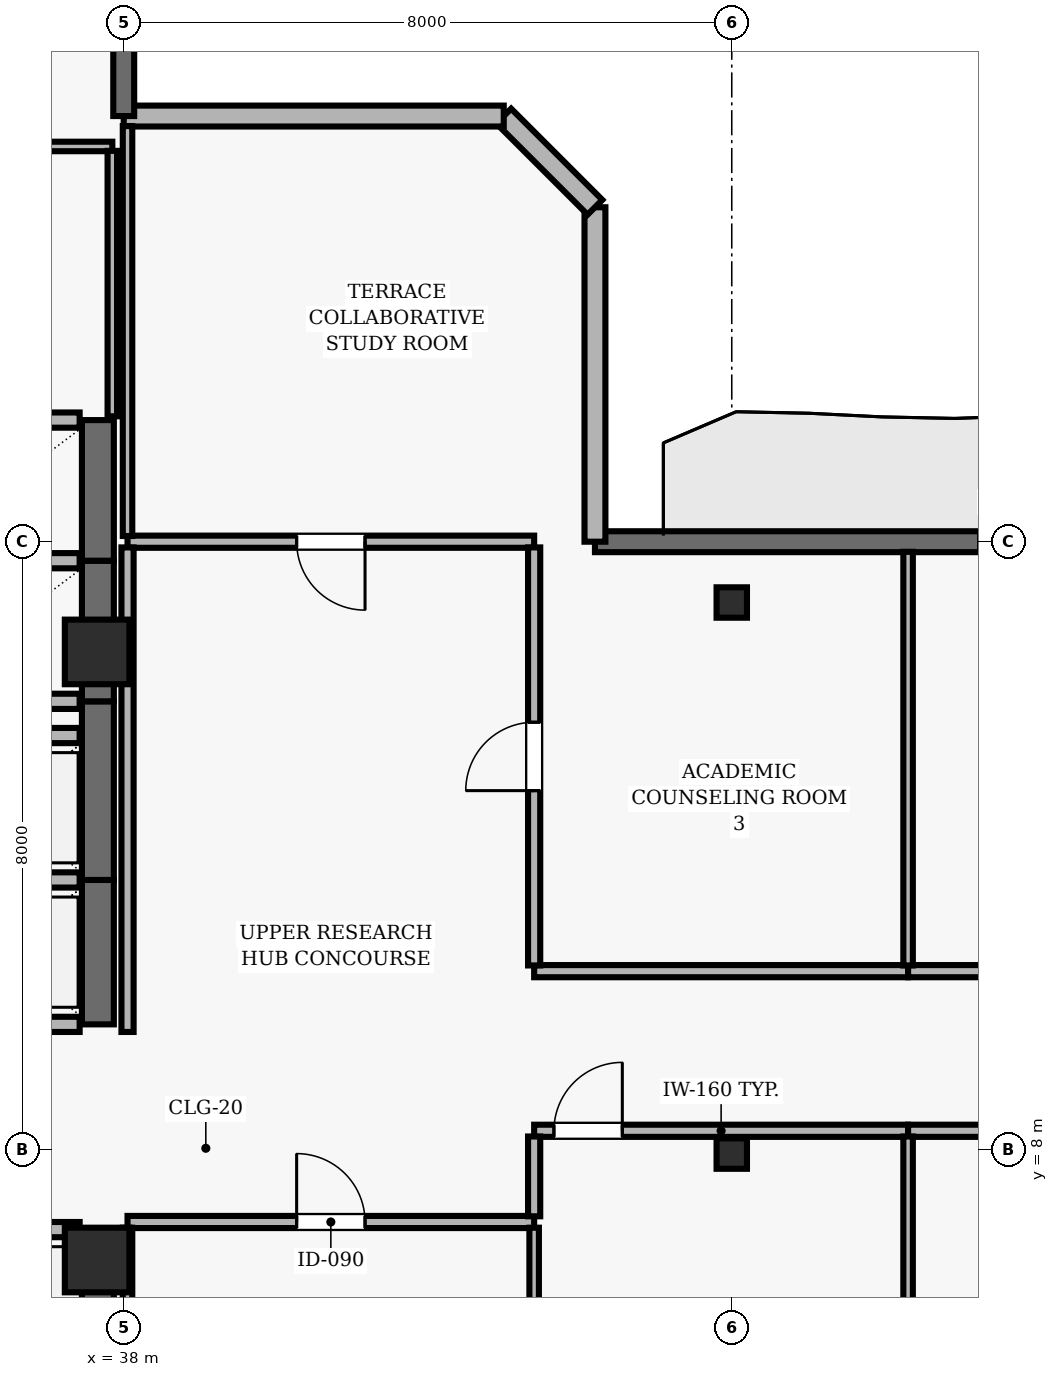
"""IFC4 building model, lengths in metres.
Left out: names, types, materials, properties, quantities, classifications, styles, units other than length and angle.
Written with IfcOpenShell. Run it as: python <this file> out.ifc"""

import sys

from ifc_helpers import new_model, si_unit, direction, frame, frame_2d, origin, origin_2d, place, context, subcontext, project, spatial, rectangle, hollow_rectangle, extrude, element, fill, save


model = new_model("IFC4")
c1 = context("Model", 3, precision=1e-05, world=origin(), true_north=direction((0.0, 1.0)))
c2 = subcontext(c1, "Body", "Model", "MODEL_VIEW")
j1 = project(units=[si_unit("LENGTHUNIT", "METRE"), si_unit("PLANEANGLEUNIT", "RADIAN")], contexts=[c1])
p1 = place(None, origin())
s1 = spatial("IfcSite", under=j1, at=p1, CompositionType="ELEMENT")
p2 = place(p1, origin())
s2 = spatial("IfcBuilding", under=s1, at=p2, CompositionType="ELEMENT")
p3 = place(p2, frame((0.0, 0.0, 295.0)))
s3 = spatial("IfcBuildingStorey", under=s2, at=p3, CompositionType="ELEMENT", Elevation=295.0)
for number, where, z_axis, x_axis in (
    (1, (37.65, 6.55, 0.0), (0.0, 0.0, 1.0), (1.0, 0.0, 0.0)),
    (2, (37.65, 14.55, 0.0), (0.0, 0.0, 1.0), (1.0, 0.0, 0.0)),
):
    element("IfcColumn", number, at=place(p3, frame(where, z_axis=z_axis, x_axis=x_axis)), inside=s3, PredefinedType="COLUMN", context=c2, shape_type="SweptSolid", body=[
        extrude(rectangle(XDim=0.85, YDim=0.85, at=origin_2d()), origin(), (0.0, 0.0, 1.0), 3.9),
    ])
for number, where, z_axis, x_axis in (
    (3, (46.0, 7.95, 0.0), (0.0, 0.0, 1.0), (1.0, 0.0, 0.0)),
    (4, (46.0, 15.2, 0.0), (0.0, 0.0, 1.0), (1.0, 0.0, 0.0)),
):
    element("IfcColumn", number, at=place(p3, frame(where, z_axis=z_axis, x_axis=x_axis)), inside=s3, PredefinedType="COLUMN", context=c2, shape_type="SweptSolid", body=[
        extrude(hollow_rectangle(XDim=0.4, YDim=0.4, WallThickness=0.02, at=origin_2d()), origin(), (0.0, 0.0, 1.0), 3.9),
    ])
p4 = place(p3, frame((57.3, 16.0, 0.0), z_axis=(0.0, 0.0, 1.0), x_axis=(-1.0, 0.0, 0.0)))
e5 = element("IfcWall", 5, at=p4, inside=s3, PredefinedType="SOLIDWALL", context=c2, shape_type="SweptSolid", body=[
    extrude(rectangle(XDim=13.1, YDim=0.275, at=frame_2d((6.55, 0.0))), origin(), (0.0, 0.0, 1.0), 3.69),
])
p5 = place(p4, frame((7.05, 0.0, 0.0)))
e6 = element("IfcOpeningElement", 6, at=p5, cuts=e5, PredefinedType="OPENING", context=c2, shape_type="SweptSolid", body=[
    extrude(rectangle(XDim=1.0, YDim=2.2, at=frame_2d((0.5, 1.1))), frame((0.0, 0.147, 0.0), z_axis=(0.0, -1.0, 0.0), x_axis=(1.0, 0.0, 0.0)), (0.0, 0.0, 1.0), 0.295),
])
p6 = place(p3, frame((44.2, 16.0, 0.0), z_axis=(0.0, 0.0, 1.0), x_axis=(0.0, 1.0, 0.0)))
e7 = element("IfcWall", 7, at=p6, inside=s3, PredefinedType="SOLIDWALL", context=c2, shape_type="SweptSolid", body=[
    extrude(rectangle(XDim=4.4, YDim=0.275, at=frame_2d((2.2, 0.0))), origin(), (0.0, 0.0, 1.0), 3.69),
])
p7 = place(p3, frame((44.2, 20.4, 0.0), z_axis=(0.0, 0.0, 1.0), x_axis=(-0.707034851297, 0.707178703759, 0.0)))
e8 = element("IfcWall", 8, at=p7, inside=s3, PredefinedType="SOLIDWALL", context=c2, shape_type="SweptSolid", body=[
    extrude(rectangle(XDim=1.697, YDim=0.275, at=frame_2d((0.849, 0.0))), origin(), (0.0, 0.0, 1.0), 3.69),
])
p8 = place(p3, frame((43.0, 21.6, 0.0), z_axis=(0.0, 0.0, 1.0), x_axis=(-1.0, 0.0, 0.0)))
e9 = element("IfcWall", 9, at=p8, inside=s3, PredefinedType="SOLIDWALL", context=c2, shape_type="SweptSolid", body=[
    extrude(rectangle(XDim=5.0, YDim=0.275, at=frame_2d((2.5, 0.0))), origin(), (0.0, 0.0, 1.0), 3.69),
])
p9 = place(p3, frame((38.0, 21.6, 0.0), z_axis=(0.0, 0.0, 1.0), x_axis=(0.0, 1.0, 0.0)))
e10 = element("IfcWall", 10, at=p9, inside=s3, PredefinedType="SOLIDWALL", context=c2, shape_type="SweptSolid", body=[
    extrude(rectangle(XDim=13.7, YDim=0.275, at=frame_2d((6.85, 0.0))), origin(), (0.0, 0.0, 1.0), 3.69),
])
p10 = place(p9, frame((5.35, 0.0, 0.0)))
e11 = element("IfcOpeningElement", 11, at=p10, cuts=e10, PredefinedType="OPENING", context=c2, shape_type="SweptSolid", body=[
    extrude(rectangle(XDim=1.0, YDim=2.2, at=frame_2d((0.5, 1.1))), frame((0.0, 0.147, 0.0), z_axis=(0.0, -1.0, 0.0), x_axis=(1.0, 0.0, 0.0)), (0.0, 0.0, 1.0), 0.295),
])
p11 = place(p9, frame((8.875, 0.0, 0.9)))
e12 = element("IfcOpeningElement", 12, at=p11, cuts=e10, PredefinedType="OPENING", context=c2, shape_type="SweptSolid", body=[
    extrude(rectangle(XDim=2.8, YDim=1.8, at=frame_2d((1.4, 0.9))), frame((0.0, 0.147, 0.0), z_axis=(0.0, -1.0, 0.0), x_axis=(1.0, 0.0, 0.0)), (0.0, 0.0, 1.0), 0.295),
])
p12 = place(p3, frame((37.66, 4.7, 0.0), z_axis=(0.0, 0.0, 1.0), x_axis=(0.0, 1.0, 0.0)))
e13 = element("IfcWall", 13, at=p12, inside=s3, PredefinedType="SHEAR", context=c2, shape_type="SweptSolid", body=[
    extrude(rectangle(XDim=2.25, YDim=0.42, at=frame_2d((1.125, 0.0))), origin(), (0.0, 0.0, 1.0), 3.69),
])
p13 = place(p3, frame((37.42, 6.95, 0.0), z_axis=(0.0, 0.0, 1.0), x_axis=(-1.0, 0.0, 0.0)))
e14 = element("IfcWall", 14, at=p13, inside=s3, PredefinedType="SOLIDWALL", context=c2, shape_type="SweptSolid", body=[
    extrude(rectangle(XDim=2.14, YDim=0.2, at=frame_2d((1.07, 0.0))), origin(), (0.0, 0.0, 1.0), 3.69),
])
p14 = place(p3, frame((37.66, 9.65, 0.0), z_axis=(0.0, 0.0, 1.0), x_axis=(0.0, 1.0, 0.0)))
e15 = element("IfcWall", 15, at=p14, inside=s3, PredefinedType="SHEAR", context=c2, shape_type="SweptSolid", body=[
    extrude(rectangle(XDim=1.9, YDim=0.42, at=frame_2d((0.95, 0.0))), origin(), (0.0, 0.0, 1.0), 3.69),
])
for number, where, z_axis, x_axis in (
    (16, (35.28, 9.65, 0.0), (0.0, 0.0, 1.0), (1.0, 0.0, 0.0)),
    (17, (37.42, 11.55, 0.0), (0.0, 0.0, 1.0), (-1.0, 0.0, 0.0)),
):
    element("IfcWall", number, at=place(p3, frame(where, z_axis=z_axis, x_axis=x_axis)), inside=s3, PredefinedType="SOLIDWALL", context=c2, shape_type="SweptSolid", body=[
        extrude(rectangle(XDim=2.14, YDim=0.2, at=frame_2d((1.07, 0.0))), origin(), (0.0, 0.0, 1.0), 3.69),
    ])
p15 = place(p3, frame((37.66, 11.55, 0.0), z_axis=(0.0, 0.0, 1.0), x_axis=(0.0, 1.0, 0.0)))
e18 = element("IfcWall", 18, at=p15, inside=s3, PredefinedType="SHEAR", context=c2, shape_type="SweptSolid", body=[
    extrude(rectangle(XDim=2.35, YDim=0.42, at=frame_2d((1.175, 0.0))), origin(), (0.0, 0.0, 1.0), 3.69),
])
p16 = place(p3, frame((37.42, 13.45, 0.0), z_axis=(0.0, 0.0, 1.0), x_axis=(-1.0, 0.0, 0.0)))
e19 = element("IfcWall", 19, at=p16, inside=s3, PredefinedType="SOLIDWALL", context=c2, shape_type="SweptSolid", body=[
    extrude(rectangle(XDim=2.14, YDim=0.2, at=frame_2d((1.07, 0.0))), origin(), (0.0, 0.0, 1.0), 3.69),
])
p17 = place(p3, frame((37.66, 13.9, 0.0), z_axis=(0.0, 0.0, 1.0), x_axis=(0.0, 1.0, 0.0)))
e20 = element("IfcWall", 20, at=p17, inside=s3, PredefinedType="SHEAR", context=c2, shape_type="SweptSolid", body=[
    extrude(rectangle(XDim=1.85, YDim=0.42, at=frame_2d((0.925, 0.0))), origin(), (0.0, 0.0, 1.0), 3.69),
])
for number, where, z_axis, x_axis in (
    (21, (35.28, 13.9, 0.0), (0.0, 0.0, 1.0), (1.0, 0.0, 0.0)),
    (22, (37.42, 15.75, 0.0), (0.0, 0.0, 1.0), (-1.0, 0.0, 0.0)),
):
    element("IfcWall", number, at=place(p3, frame(where, z_axis=z_axis, x_axis=x_axis)), inside=s3, PredefinedType="SOLIDWALL", context=c2, shape_type="SweptSolid", body=[
        extrude(rectangle(XDim=2.14, YDim=0.2, at=frame_2d((1.07, 0.0))), origin(), (0.0, 0.0, 1.0), 3.69),
    ])
p18 = place(p3, frame((37.66, 15.75, 0.0), z_axis=(0.0, 0.0, 1.0), x_axis=(0.0, 1.0, 0.0)))
e23 = element("IfcWall", 23, at=p18, inside=s3, PredefinedType="SHEAR", context=c2, shape_type="SweptSolid", body=[
    extrude(rectangle(XDim=1.85, YDim=0.42, at=frame_2d((0.925, 0.0))), origin(), (0.0, 0.0, 1.0), 3.69),
])
p19 = place(p3, frame((37.42, 17.6, 0.0), z_axis=(0.0, 0.0, 1.0), x_axis=(-1.0, 0.0, 0.0)))
e24 = element("IfcWall", 24, at=p19, inside=s3, PredefinedType="SOLIDWALL", context=c2, shape_type="SweptSolid", body=[
    extrude(rectangle(XDim=2.14, YDim=0.2, at=frame_2d((1.07, 0.0))), origin(), (0.0, 0.0, 1.0), 3.69),
])
p20 = place(p3, frame((35.85, 21.2, 0.0), z_axis=(0.0, 0.0, 1.0), x_axis=(1.0, 0.0, 0.0)))
e25 = element("IfcWall", 25, at=p20, inside=s3, PredefinedType="PARTITIONING", context=c2, shape_type="SweptSolid", body=[
    extrude(rectangle(XDim=2.0, YDim=0.125, at=frame_2d((1.0, 0.0))), origin(), (0.0, 0.0, 1.0), 3.69),
])
p21 = place(p3, frame((38.05, 7.05, 0.0), z_axis=(0.0, 0.0, 1.0), x_axis=(1.0, 0.0, 0.0)))
e26 = element("IfcWall", 26, at=p21, inside=s3, PredefinedType="PARTITIONING", context=c2, shape_type="SweptSolid", body=[
    extrude(rectangle(XDim=5.35, YDim=0.16, at=frame_2d((2.675, 0.0))), origin(), (0.0, 0.0, 1.0), 3.69),
])
p22 = place(p21, frame((2.225, 0.0, 0.0)))
e27 = element("IfcOpeningElement", 27, at=p22, cuts=e26, PredefinedType="OPENING", context=c2, shape_type="SweptSolid", body=[
    extrude(rectangle(XDim=0.9, YDim=2.1, at=frame_2d((0.45, 1.05))), frame((0.0, 0.09, 0.0), z_axis=(0.0, -1.0, 0.0), x_axis=(1.0, 0.0, 0.0)), (0.0, 0.0, 1.0), 0.18),
])
p23 = place(p3, frame((43.4, 8.25, 0.0), z_axis=(0.0, 0.0, 1.0), x_axis=(1.0, 0.0, 0.0)))
e28 = element("IfcWall", 28, at=p23, inside=s3, PredefinedType="PARTITIONING", context=c2, shape_type="SweptSolid", body=[
    extrude(rectangle(XDim=4.92, YDim=0.16, at=frame_2d((2.46, 0.0))), origin(), (0.0, 0.0, 1.0), 3.221),
])
p24 = place(p23, frame((0.26, 0.0, 0.0)))
e29 = element("IfcOpeningElement", 29, at=p24, cuts=e28, PredefinedType="OPENING", context=c2, shape_type="SweptSolid", body=[
    extrude(rectangle(XDim=0.9, YDim=2.1, at=frame_2d((0.45, 1.05))), frame((0.0, 0.09, 0.0), z_axis=(0.0, -1.0, 0.0), x_axis=(1.0, 0.0, 0.0)), (0.0, 0.0, 1.0), 0.18),
])
p25 = place(p3, frame((43.4, 16.0, 0.0), z_axis=(0.0, 0.0, 1.0), x_axis=(-1.0, 0.0, 0.0)))
e30 = element("IfcWall", 30, at=p25, inside=s3, PredefinedType="PARTITIONING", context=c2, shape_type="SweptSolid", body=[
    extrude(rectangle(XDim=5.35, YDim=0.16, at=frame_2d((2.675, 0.0))), origin(), (0.0, 0.0, 1.0), 3.39),
])
p26 = place(p25, frame((2.225, 0.0, 0.0)))
e31 = element("IfcOpeningElement", 31, at=p26, cuts=e30, PredefinedType="OPENING", context=c2, shape_type="SweptSolid", body=[
    extrude(rectangle(XDim=0.9, YDim=2.1, at=frame_2d((0.45, 1.05))), frame((0.0, 0.09, 0.0), z_axis=(0.0, -1.0, 0.0), x_axis=(1.0, 0.0, 0.0)), (0.0, 0.0, 1.0), 0.18),
])
p27 = place(p3, frame((48.32, 8.25, 0.0), z_axis=(0.0, 0.0, 1.0), x_axis=(1.0, 0.0, 0.0)))
e32 = element("IfcWall", 32, at=p27, inside=s3, PredefinedType="PARTITIONING", context=c2, shape_type="SweptSolid", body=[
    extrude(rectangle(XDim=5.58, YDim=0.16, at=frame_2d((2.79, 0.0))), origin(), (0.0, 0.0, 1.0), 3.221),
])
p28 = place(p27, frame((1.29, 0.0, 0.0)))
e33 = element("IfcOpeningElement", 33, at=p28, cuts=e32, PredefinedType="OPENING", context=c2, shape_type="SweptSolid", body=[
    extrude(rectangle(XDim=0.9, YDim=2.1, at=frame_2d((0.45, 1.05))), frame((0.0, 0.09, 0.0), z_axis=(0.0, -1.0, 0.0), x_axis=(1.0, 0.0, 0.0)), (0.0, 0.0, 1.0), 0.18),
])
p29 = place(p3, frame((48.32, 10.35, 0.0), z_axis=(0.0, 0.0, 1.0), x_axis=(-1.0, 0.0, 0.0)))
e34 = element("IfcWall", 34, at=p29, inside=s3, PredefinedType="PARTITIONING", context=c2, shape_type="SweptSolid", body=[
    extrude(rectangle(XDim=4.92, YDim=0.16, at=frame_2d((2.46, 0.0))), origin(), (0.0, 0.0, 1.0), 3.372),
])
p30 = place(p3, frame((53.9, 10.35, 0.0), z_axis=(0.0, 0.0, 1.0), x_axis=(-1.0, 0.0, 0.0)))
e35 = element("IfcWall", 35, at=p30, inside=s3, PredefinedType="PARTITIONING", context=c2, shape_type="SweptSolid", body=[
    extrude(rectangle(XDim=5.58, YDim=0.16, at=frame_2d((2.79, 0.0))), origin(), (0.0, 0.0, 1.0), 3.372),
])
p31 = place(p30, frame((2.34, 0.0, 0.0)))
e36 = element("IfcOpeningElement", 36, at=p31, cuts=e35, PredefinedType="OPENING", context=c2, shape_type="SweptSolid", body=[
    extrude(rectangle(XDim=0.9, YDim=2.1, at=frame_2d((0.45, 1.05))), frame((0.0, 0.09, 0.0), z_axis=(0.0, -1.0, 0.0), x_axis=(1.0, 0.0, 0.0)), (0.0, 0.0, 1.0), 0.18),
])
p32 = place(p3, frame((37.85, 17.65, 0.0), z_axis=(0.0, 0.0, 1.0), x_axis=(0.0, 1.0, 0.0)))
e37 = element("IfcWall", 37, at=p32, inside=s3, PredefinedType="PARTITIONING", context=c2, shape_type="SweptSolid", body=[
    extrude(rectangle(XDim=3.492, YDim=0.125, at=frame_2d((1.746, 0.0))), origin(), (0.0, 0.0, 1.0), 3.221),
])
p33 = place(p3, frame((38.05, 6.975, 0.0), z_axis=(0.0, 0.0, 1.0), x_axis=(0.0, -1.0, 0.0)))
e38 = element("IfcWall", 38, at=p33, inside=s3, PredefinedType="PARTITIONING", context=c2, shape_type="SweptSolid", body=[
    extrude(rectangle(XDim=6.842, YDim=0.125, at=frame_2d((3.421, 0.0))), origin(), (0.0, 0.0, 1.0), 3.221),
])
p34 = place(p3, frame((38.05, 15.925, 0.0), z_axis=(0.0, 0.0, 1.0), x_axis=(0.0, -1.0, 0.0)))
e39 = element("IfcWall", 39, at=p34, inside=s3, PredefinedType="PARTITIONING", context=c2, shape_type="SweptSolid", body=[
    extrude(rectangle(XDim=6.375, YDim=0.16, at=frame_2d((3.188, 0.0))), origin(), (0.0, 0.0, 1.0), 3.221),
])
p35 = place(p3, frame((38.05, 21.468, 0.0), z_axis=(0.0, 0.0, 1.0), x_axis=(0.0, -1.0, 0.0)))
e40 = element("IfcWall", 40, at=p35, inside=s3, PredefinedType="PARTITIONING", context=c2, shape_type="SweptSolid", body=[
    extrude(rectangle(XDim=5.393, YDim=0.125, at=frame_2d((2.697, 0.0))), origin(), (0.0, 0.0, 1.0), 3.221),
])
p36 = place(p3, frame((43.4, 0.09, 0.0), z_axis=(0.0, 0.0, 1.0), x_axis=(0.0, 1.0, 0.0)))
e41 = element("IfcWall", 41, at=p36, inside=s3, PredefinedType="PARTITIONING", context=c2, shape_type="SweptSolid", body=[
    extrude(rectangle(XDim=6.885, YDim=0.125, at=frame_2d((3.442, 0.0))), origin(), (0.0, 0.0, 1.0), 3.69),
])
p37 = place(p3, frame((43.4, 7.125, 0.0), z_axis=(0.0, 0.0, 1.0), x_axis=(0.0, 1.0, 0.0)))
e42 = element("IfcWall", 42, at=p37, inside=s3, PredefinedType="PARTITIONING", context=c2, shape_type="SweptSolid", body=[
    extrude(rectangle(XDim=1.05, YDim=0.16, at=frame_2d((0.525, 0.0))), origin(), (0.0, 0.0, 1.0), 3.69),
])
p38 = place(p3, frame((43.4, 10.425, 0.0), z_axis=(0.0, 0.0, 1.0), x_axis=(0.0, 1.0, 0.0)))
e43 = element("IfcWall", 43, at=p38, inside=s3, PredefinedType="PARTITIONING", context=c2, shape_type="SweptSolid", body=[
    extrude(rectangle(XDim=5.5, YDim=0.16, at=frame_2d((2.75, 0.0))), origin(), (0.0, 0.0, 1.0), 3.69),
])
p39 = place(p38, frame((2.3, 0.0, 0.0)))
e44 = element("IfcOpeningElement", 44, at=p39, cuts=e43, PredefinedType="OPENING", context=c2, shape_type="SweptSolid", body=[
    extrude(rectangle(XDim=0.9, YDim=2.1, at=frame_2d((0.45, 1.05))), frame((0.0, 0.09, 0.0), z_axis=(0.0, -1.0, 0.0), x_axis=(1.0, 0.0, 0.0)), (0.0, 0.0, 1.0), 0.18),
])
p40 = place(p3, frame((48.32, 0.09, 0.0), z_axis=(0.0, 0.0, 1.0), x_axis=(0.0, 1.0, 0.0)))
e45 = element("IfcWall", 45, at=p40, inside=s3, PredefinedType="PARTITIONING", context=c2, shape_type="SweptSolid", body=[
    extrude(rectangle(XDim=8.085, YDim=0.125, at=frame_2d((4.042, 0.0))), origin(), (0.0, 0.0, 1.0), 3.69),
])
p41 = place(p3, frame((48.32, 10.425, 0.0), z_axis=(0.0, 0.0, 1.0), x_axis=(0.0, 1.0, 0.0)))
e46 = element("IfcWall", 46, at=p41, inside=s3, PredefinedType="PARTITIONING", context=c2, shape_type="SweptSolid", body=[
    extrude(rectangle(XDim=5.442, YDim=0.125, at=frame_2d((2.721, 0.0))), origin(), (0.0, 0.0, 1.0), 3.69),
])
p42 = place(p22, origin())
e47 = element("IfcDoor", 47, at=p42, inside=s3, OperationType="SINGLE_SWING_LEFT", PredefinedType="DOOR", context=c2, shape_type="SweptSolid", body=[
    extrude(rectangle(XDim=0.9, YDim=2.1, at=frame_2d((0.45, 1.05))), frame((0.0, 0.025, 0.0), z_axis=(0.0, -1.0, 0.0), x_axis=(1.0, 0.0, 0.0)), (0.0, 0.0, 1.0), 0.05),
])
fill(e27, e47)
p43 = place(p24, origin())
e48 = element("IfcDoor", 48, at=p43, inside=s3, OperationType="SINGLE_SWING_RIGHT", PredefinedType="DOOR", context=c2, shape_type="SweptSolid", body=[
    extrude(rectangle(XDim=0.9, YDim=2.1, at=frame_2d((0.45, 1.05))), frame((0.0, 0.025, 0.0), z_axis=(0.0, -1.0, 0.0), x_axis=(1.0, 0.0, 0.0)), (0.0, 0.0, 1.0), 0.05),
])
fill(e29, e48)
p44 = place(p39, origin())
e49 = element("IfcDoor", 49, at=p44, inside=s3, OperationType="SINGLE_SWING_LEFT", PredefinedType="DOOR", context=c2, shape_type="SweptSolid", body=[
    extrude(rectangle(XDim=0.9, YDim=2.1, at=frame_2d((0.45, 1.05))), frame((0.0, 0.025, 0.0), z_axis=(0.0, -1.0, 0.0), x_axis=(1.0, 0.0, 0.0)), (0.0, 0.0, 1.0), 0.05),
])
fill(e44, e49)
p45 = place(p26, origin())
e50 = element("IfcDoor", 50, at=p45, inside=s3, OperationType="SINGLE_SWING_LEFT", PredefinedType="DOOR", context=c2, shape_type="SweptSolid", body=[
    extrude(rectangle(XDim=0.9, YDim=2.1, at=frame_2d((0.45, 1.05))), frame((0.0, 0.025, 0.0), z_axis=(0.0, -1.0, 0.0), x_axis=(1.0, 0.0, 0.0)), (0.0, 0.0, 1.0), 0.05),
])
fill(e31, e50)
save(model, sys.argv[1])
